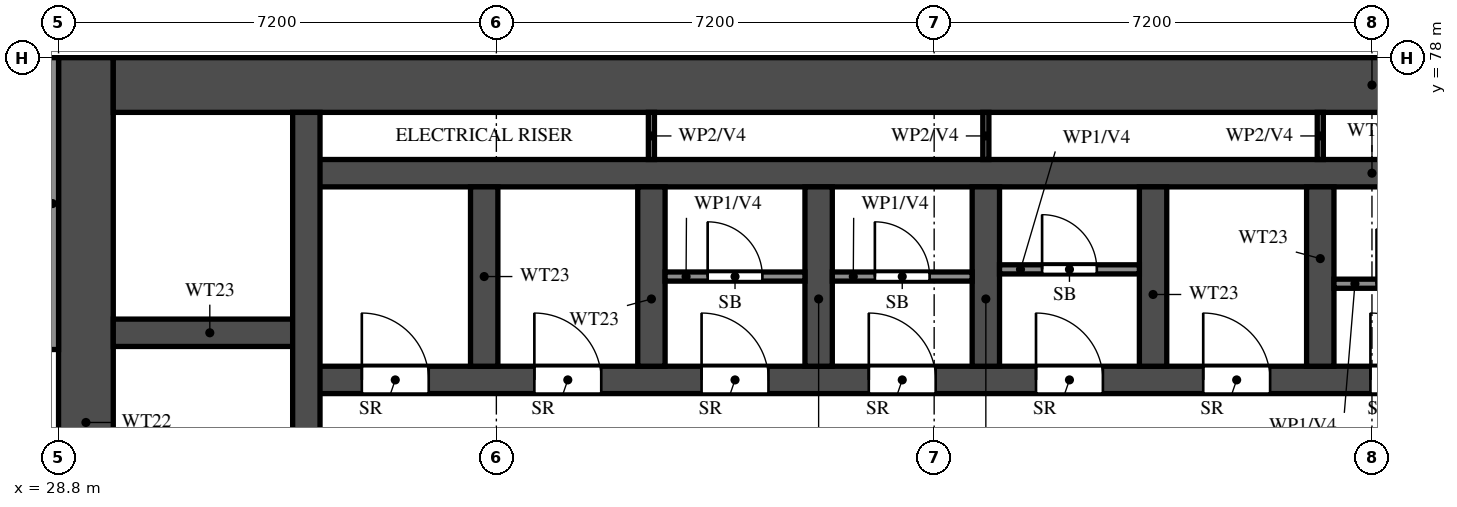
"""IFC4 building model, lengths in metres.
Left out: names, types, materials, properties, quantities, classifications, styles, units other than length and angle.
Written with IfcOpenShell. Run it as: python <this file> out.ifc"""

import sys

from ifc_helpers import new_model, si_unit, direction, frame, frame_2d, origin, place, context, subcontext, project, spatial, rectangle, extrude, element, fill, save


model = new_model("IFC4")
c1 = context("Model", 3, precision=1e-05, world=origin(), true_north=direction((0.0, 1.0)))
c2 = subcontext(c1, "Body", "Model", "MODEL_VIEW")
j1 = project(units=[si_unit("LENGTHUNIT", "METRE"), si_unit("PLANEANGLEUNIT", "RADIAN")], contexts=[c1])
p1 = place(None, origin())
s1 = spatial("IfcSite", under=j1, at=p1, CompositionType="ELEMENT")
p2 = place(p1, origin())
s2 = spatial("IfcBuilding", under=s1, at=p2, CompositionType="ELEMENT")
p3 = place(p2, frame((0.0, 0.0, 104.0)))
s3 = spatial("IfcBuildingStorey", under=s2, at=p3, CompositionType="ELEMENT", Elevation=104.0)
p4 = place(p3, frame((29.25, 66.0, 0.0), z_axis=(0.0, 0.0, 1.0), x_axis=(0.0, 1.0, 0.0)))
e1 = element("IfcWall", 1, at=p4, inside=s3, PredefinedType="SHEAR", context=c2, shape_type="SweptSolid", body=[
    extrude(rectangle(XDim=12.0, YDim=0.9, at=frame_2d((6.0, 0.0))), origin(), (0.0, 0.0, 1.0), 3.1),
])
p5 = place(p3, frame((29.7, 77.55, 0.0), z_axis=(0.0, 0.0, 1.0), x_axis=(1.0, 0.0, 0.0)))
e2 = element("IfcWall", 2, at=p5, inside=s3, PredefinedType="SHEAR", context=c2, shape_type="SweptSolid", body=[
    extrude(rectangle(XDim=41.4, YDim=0.9, at=frame_2d((20.7, 0.0))), origin(), (0.0, 0.0, 1.0), 3.1),
])
p6 = place(p3, frame((32.875, 72.7, 0.0), z_axis=(0.0, 0.0, 1.0), x_axis=(1.0, 0.0, 0.0)))
e3 = element("IfcWall", 3, at=p6, inside=s3, PredefinedType="SHEAR", context=c2, shape_type="SweptSolid", body=[
    extrude(rectangle(XDim=35.05, YDim=0.45, at=frame_2d((17.525, 0.0))), origin(), (0.0, 0.0, 1.0), 3.1),
])
p7 = place(p6, frame((19.8, 0.0, 0.0)))
e4 = element("IfcOpeningElement", 4, at=p7, cuts=e3, PredefinedType="OPENING", context=c2, shape_type="SweptSolid", body=[
    extrude(rectangle(XDim=1.1, YDim=2.1, at=frame_2d((0.55, 1.05))), frame((0.0, 0.235, 0.0), z_axis=(0.0, -1.0, 0.0), x_axis=(1.0, 0.0, 0.0)), (0.0, 0.0, 1.0), 0.47),
])
p8 = place(p6, frame((27.65, 0.0, 0.0)))
e5 = element("IfcOpeningElement", 5, at=p8, cuts=e3, PredefinedType="OPENING", context=c2, shape_type="SweptSolid", body=[
    extrude(rectangle(XDim=1.1, YDim=2.1, at=frame_2d((0.55, 1.05))), frame((0.0, 0.235, 0.0), z_axis=(0.0, -1.0, 0.0), x_axis=(1.0, 0.0, 0.0)), (0.0, 0.0, 1.0), 0.47),
])
p9 = place(p6, frame((30.25, 0.0, 0.0)))
e6 = element("IfcOpeningElement", 6, at=p9, cuts=e3, PredefinedType="OPENING", context=c2, shape_type="SweptSolid", body=[
    extrude(rectangle(XDim=1.1, YDim=2.1, at=frame_2d((0.55, 1.05))), frame((0.0, 0.235, 0.0), z_axis=(0.0, -1.0, 0.0), x_axis=(1.0, 0.0, 0.0)), (0.0, 0.0, 1.0), 0.47),
])
p10 = place(p6, frame((3.75, 0.0, 0.0)))
e7 = element("IfcOpeningElement", 7, at=p10, cuts=e3, PredefinedType="OPENING", context=c2, shape_type="SweptSolid", body=[
    extrude(rectangle(XDim=1.1, YDim=2.1, at=frame_2d((0.55, 1.05))), frame((0.0, 0.235, 0.0), z_axis=(0.0, -1.0, 0.0), x_axis=(1.0, 0.0, 0.0)), (0.0, 0.0, 1.0), 0.47),
])
p11 = place(p6, frame((6.5, 0.0, 0.0)))
e8 = element("IfcOpeningElement", 8, at=p11, cuts=e3, PredefinedType="OPENING", context=c2, shape_type="SweptSolid", body=[
    extrude(rectangle(XDim=1.1, YDim=2.1, at=frame_2d((0.55, 1.05))), frame((0.0, 0.235, 0.0), z_axis=(0.0, -1.0, 0.0), x_axis=(1.0, 0.0, 0.0)), (0.0, 0.0, 1.0), 0.47),
])
p12 = place(p6, frame((9.25, 0.0, 0.0)))
e9 = element("IfcOpeningElement", 9, at=p12, cuts=e3, PredefinedType="OPENING", context=c2, shape_type="SweptSolid", body=[
    extrude(rectangle(XDim=1.1, YDim=2.1, at=frame_2d((0.55, 1.05))), frame((0.0, 0.235, 0.0), z_axis=(0.0, -1.0, 0.0), x_axis=(1.0, 0.0, 0.0)), (0.0, 0.0, 1.0), 0.47),
])
p13 = place(p6, frame((12.0, 0.0, 0.0)))
e10 = element("IfcOpeningElement", 10, at=p13, cuts=e3, PredefinedType="OPENING", context=c2, shape_type="SweptSolid", body=[
    extrude(rectangle(XDim=1.1, YDim=2.1, at=frame_2d((0.55, 1.05))), frame((0.0, 0.235, 0.0), z_axis=(0.0, -1.0, 0.0), x_axis=(1.0, 0.0, 0.0)), (0.0, 0.0, 1.0), 0.47),
])
p14 = place(p6, frame((14.75, 0.0, 0.0)))
e11 = element("IfcOpeningElement", 11, at=p14, cuts=e3, PredefinedType="OPENING", context=c2, shape_type="SweptSolid", body=[
    extrude(rectangle(XDim=1.1, YDim=2.1, at=frame_2d((0.55, 1.05))), frame((0.0, 0.235, 0.0), z_axis=(0.0, -1.0, 0.0), x_axis=(1.0, 0.0, 0.0)), (0.0, 0.0, 1.0), 0.47),
])
p15 = place(p6, frame((17.5, 0.0, 0.0)))
e12 = element("IfcOpeningElement", 12, at=p15, cuts=e3, PredefinedType="OPENING", context=c2, shape_type="SweptSolid", body=[
    extrude(rectangle(XDim=1.1, YDim=2.1, at=frame_2d((0.55, 1.05))), frame((0.0, 0.235, 0.0), z_axis=(0.0, -1.0, 0.0), x_axis=(1.0, 0.0, 0.0)), (0.0, 0.0, 1.0), 0.47),
])
p16 = place(p6, frame((0.913, 0.0, 0.0)))
e13 = element("IfcOpeningElement", 13, at=p16, cuts=e3, PredefinedType="OPENING", context=c2, shape_type="SweptSolid", body=[
    extrude(rectangle(XDim=1.1, YDim=2.1, at=frame_2d((0.55, 1.05))), frame((0.0, 0.235, 0.0), z_axis=(0.0, -1.0, 0.0), x_axis=(1.0, 0.0, 0.0)), (0.0, 0.0, 1.0), 0.47),
])
p17 = place(p3, frame((32.875, 76.1, 0.0), z_axis=(0.0, 0.0, 1.0), x_axis=(1.0, 0.0, 0.0)))
e14 = element("IfcWall", 14, at=p17, inside=s3, PredefinedType="SHEAR", context=c2, shape_type="SweptSolid", body=[
    extrude(rectangle(XDim=35.05, YDim=0.45, at=frame_2d((17.525, 0.0))), origin(), (0.0, 0.0, 1.0), 3.1),
])
p18 = place(p3, frame((29.7, 73.475, 0.0), z_axis=(0.0, 0.0, 1.0), x_axis=(1.0, 0.0, 0.0)))
e15 = element("IfcWall", 15, at=p18, inside=s3, PredefinedType="SHEAR", context=c2, shape_type="SweptSolid", body=[
    extrude(rectangle(XDim=3.175, YDim=0.45, at=frame_2d((1.587, 0.0))), origin(), (0.0, 0.0, 1.0), 3.1),
])
p19 = place(p3, frame((32.875, 66.45, 0.0), z_axis=(0.0, 0.0, 1.0), x_axis=(0.0, 1.0, 0.0)))
e16 = element("IfcWall", 16, at=p19, inside=s3, PredefinedType="SHEAR", context=c2, shape_type="SweptSolid", body=[
    extrude(rectangle(XDim=10.65, YDim=0.45, at=frame_2d((5.325, 0.0))), origin(), (0.0, 0.0, 1.0), 3.1),
])
for number, where, z_axis, x_axis in (
    (17, (35.8, 72.925, 0.0), (0.0, 0.0, 1.0), (0.0, 1.0, 0.0)),
    (18, (38.55, 72.925, 0.0), (0.0, 0.0, 1.0), (0.0, 1.0, 0.0)),
    (19, (41.3, 72.925, 0.0), (0.0, 0.0, 1.0), (0.0, 1.0, 0.0)),
    (20, (44.05, 72.925, 0.0), (0.0, 0.0, 1.0), (0.0, 1.0, 0.0)),
    (21, (46.8, 72.925, 0.0), (0.0, 0.0, 1.0), (0.0, 1.0, 0.0)),
    (22, (49.55, 72.925, 0.0), (0.0, 0.0, 1.0), (0.0, 1.0, 0.0)),
):
    element("IfcWall", number, at=place(p3, frame(where, z_axis=z_axis, x_axis=x_axis)), inside=s3, PredefinedType="SHEAR", context=c2, shape_type="SweptSolid", body=[
        extrude(rectangle(XDim=2.95, YDim=0.45, at=frame_2d((1.475, 0.0))), origin(), (0.0, 0.0, 1.0), 3.1),
    ])
p20 = place(p3, frame((38.775, 74.4, 0.0), z_axis=(0.0, 0.0, 1.0), x_axis=(1.0, 0.0, 0.0)))
e23 = element("IfcWall", 23, at=p20, inside=s3, PredefinedType="PARTITIONING", context=c2, shape_type="SweptSolid", body=[
    extrude(rectangle(XDim=2.3, YDim=0.15, at=frame_2d((1.15, 0.0))), origin(), (0.0, 0.0, 1.0), 3.1),
])
p21 = place(p20, frame((0.7, 0.0, 0.0)))
e24 = element("IfcOpeningElement", 24, at=p21, cuts=e23, PredefinedType="OPENING", context=c2, shape_type="SweptSolid", body=[
    extrude(rectangle(XDim=0.9, YDim=2.1, at=frame_2d((0.45, 1.05))), frame((0.0, 0.085, 0.0), z_axis=(0.0, -1.0, 0.0), x_axis=(1.0, 0.0, 0.0)), (0.0, 0.0, 1.0), 0.17),
])
p22 = place(p3, frame((41.525, 74.4, 0.0), z_axis=(0.0, 0.0, 1.0), x_axis=(1.0, 0.0, 0.0)))
e25 = element("IfcWall", 25, at=p22, inside=s3, PredefinedType="PARTITIONING", context=c2, shape_type="SweptSolid", body=[
    extrude(rectangle(XDim=2.3, YDim=0.15, at=frame_2d((1.15, 0.0))), origin(), (0.0, 0.0, 1.0), 3.1),
])
p23 = place(p22, frame((0.7, 0.0, 0.0)))
e26 = element("IfcOpeningElement", 26, at=p23, cuts=e25, PredefinedType="OPENING", context=c2, shape_type="SweptSolid", body=[
    extrude(rectangle(XDim=0.9, YDim=2.1, at=frame_2d((0.45, 1.05))), frame((0.0, 0.085, 0.0), z_axis=(0.0, -1.0, 0.0), x_axis=(1.0, 0.0, 0.0)), (0.0, 0.0, 1.0), 0.17),
])
p24 = place(p3, frame((44.275, 74.518, 0.0), z_axis=(0.0, 0.0, 1.0), x_axis=(1.0, 0.0, 0.0)))
e27 = element("IfcWall", 27, at=p24, inside=s3, PredefinedType="PARTITIONING", context=c2, shape_type="SweptSolid", body=[
    extrude(rectangle(XDim=2.3, YDim=0.15, at=frame_2d((1.15, 0.0))), origin(), (0.0, 0.0, 1.0), 3.1),
])
p25 = place(p24, frame((0.7, 0.0, 0.0)))
e28 = element("IfcOpeningElement", 28, at=p25, cuts=e27, PredefinedType="OPENING", context=c2, shape_type="SweptSolid", body=[
    extrude(rectangle(XDim=0.9, YDim=2.1, at=frame_2d((0.45, 1.05))), frame((0.0, 0.085, 0.0), z_axis=(0.0, -1.0, 0.0), x_axis=(1.0, 0.0, 0.0)), (0.0, 0.0, 1.0), 0.17),
])
p26 = place(p3, frame((49.775, 74.282, 0.0), z_axis=(0.0, 0.0, 1.0), x_axis=(1.0, 0.0, 0.0)))
e29 = element("IfcWall", 29, at=p26, inside=s3, PredefinedType="PARTITIONING", context=c2, shape_type="SweptSolid", body=[
    extrude(rectangle(XDim=2.3, YDim=0.15, at=frame_2d((1.15, 0.0))), origin(), (0.0, 0.0, 1.0), 3.1),
])
p27 = place(p26, frame((0.7, 0.0, 0.0)))
e30 = element("IfcOpeningElement", 30, at=p27, cuts=e29, PredefinedType="OPENING", context=c2, shape_type="SweptSolid", body=[
    extrude(rectangle(XDim=0.9, YDim=2.1, at=frame_2d((0.45, 1.05))), frame((0.0, 0.085, 0.0), z_axis=(0.0, -1.0, 0.0), x_axis=(1.0, 0.0, 0.0)), (0.0, 0.0, 1.0), 0.17),
])
for number, where, z_axis, x_axis in (
    (31, (38.55, 76.325, 0.0), (0.0, 0.0, 1.0), (0.0, 1.0, 0.0)),
    (32, (44.05, 76.325, 0.0), (0.0, 0.0, 1.0), (0.0, 1.0, 0.0)),
    (33, (49.55, 76.325, 0.0), (0.0, 0.0, 1.0), (0.0, 1.0, 0.0)),
):
    element("IfcWall", number, at=place(p3, frame(where, z_axis=z_axis, x_axis=x_axis)), inside=s3, PredefinedType="PARTITIONING", context=c2, shape_type="SweptSolid", body=[
        extrude(rectangle(XDim=0.775, YDim=0.1, at=frame_2d((0.388, 0.0))), origin(), (0.0, 0.0, 1.0), 3.1),
    ])
p28 = place(p3, frame((28.7, 73.2, 0.0), z_axis=(0.0, 0.0, 1.0), x_axis=(0.0, 1.0, 0.0)))
e34 = element("IfcWall", 34, at=p28, inside=s3, PredefinedType="SOLIDWALL", context=c2, shape_type="SweptSolid", body=[
    extrude(rectangle(XDim=4.8, YDim=0.2, at=frame_2d((2.4, 0.0))), origin(), (0.0, 0.0, 1.0), 3.1),
])
p29 = place(p10, origin())
e35 = element("IfcDoor", 35, at=p29, inside=s3, OperationType="SINGLE_SWING_LEFT", PredefinedType="DOOR", context=c2, shape_type="SweptSolid", body=[
    extrude(rectangle(XDim=1.1, YDim=2.1, at=frame_2d((0.55, 1.05))), frame((0.0, 0.025, 0.0), z_axis=(0.0, -1.0, 0.0), x_axis=(1.0, 0.0, 0.0)), (0.0, 0.0, 1.0), 0.05),
])
fill(e7, e35)
p30 = place(p11, origin())
e36 = element("IfcDoor", 36, at=p30, inside=s3, OperationType="SINGLE_SWING_LEFT", PredefinedType="DOOR", context=c2, shape_type="SweptSolid", body=[
    extrude(rectangle(XDim=1.1, YDim=2.1, at=frame_2d((0.55, 1.05))), frame((0.0, 0.025, 0.0), z_axis=(0.0, -1.0, 0.0), x_axis=(1.0, 0.0, 0.0)), (0.0, 0.0, 1.0), 0.05),
])
fill(e8, e36)
p31 = place(p21, origin())
e37 = element("IfcDoor", 37, at=p31, inside=s3, OperationType="SINGLE_SWING_RIGHT", PredefinedType="DOOR", context=c2, shape_type="SweptSolid", body=[
    extrude(rectangle(XDim=0.9, YDim=2.1, at=frame_2d((0.45, 1.05))), frame((0.0, 0.025, 0.0), z_axis=(0.0, -1.0, 0.0), x_axis=(1.0, 0.0, 0.0)), (0.0, 0.0, 1.0), 0.05),
])
fill(e24, e37)
p32 = place(p12, origin())
e38 = element("IfcDoor", 38, at=p32, inside=s3, OperationType="SINGLE_SWING_LEFT", PredefinedType="DOOR", context=c2, shape_type="SweptSolid", body=[
    extrude(rectangle(XDim=1.1, YDim=2.1, at=frame_2d((0.55, 1.05))), frame((0.0, 0.025, 0.0), z_axis=(0.0, -1.0, 0.0), x_axis=(1.0, 0.0, 0.0)), (0.0, 0.0, 1.0), 0.05),
])
fill(e9, e38)
p33 = place(p23, origin())
e39 = element("IfcDoor", 39, at=p33, inside=s3, OperationType="SINGLE_SWING_LEFT", PredefinedType="DOOR", context=c2, shape_type="SweptSolid", body=[
    extrude(rectangle(XDim=0.9, YDim=2.1, at=frame_2d((0.45, 1.05))), frame((0.0, 0.025, 0.0), z_axis=(0.0, -1.0, 0.0), x_axis=(1.0, 0.0, 0.0)), (0.0, 0.0, 1.0), 0.05),
])
fill(e26, e39)
p34 = place(p13, origin())
e40 = element("IfcDoor", 40, at=p34, inside=s3, OperationType="SINGLE_SWING_LEFT", PredefinedType="DOOR", context=c2, shape_type="SweptSolid", body=[
    extrude(rectangle(XDim=1.1, YDim=2.1, at=frame_2d((0.55, 1.05))), frame((0.0, 0.025, 0.0), z_axis=(0.0, -1.0, 0.0), x_axis=(1.0, 0.0, 0.0)), (0.0, 0.0, 1.0), 0.05),
])
fill(e10, e40)
p35 = place(p25, origin())
e41 = element("IfcDoor", 41, at=p35, inside=s3, OperationType="SINGLE_SWING_LEFT", PredefinedType="DOOR", context=c2, shape_type="SweptSolid", body=[
    extrude(rectangle(XDim=0.9, YDim=2.1, at=frame_2d((0.45, 1.05))), frame((0.0, 0.025, 0.0), z_axis=(0.0, -1.0, 0.0), x_axis=(1.0, 0.0, 0.0)), (0.0, 0.0, 1.0), 0.05),
])
fill(e28, e41)
p36 = place(p14, origin())
e42 = element("IfcDoor", 42, at=p36, inside=s3, OperationType="SINGLE_SWING_LEFT", PredefinedType="DOOR", context=c2, shape_type="SweptSolid", body=[
    extrude(rectangle(XDim=1.1, YDim=2.1, at=frame_2d((0.55, 1.05))), frame((0.0, 0.025, 0.0), z_axis=(0.0, -1.0, 0.0), x_axis=(1.0, 0.0, 0.0)), (0.0, 0.0, 1.0), 0.05),
])
fill(e11, e42)
p37 = place(p15, origin())
e43 = element("IfcDoor", 43, at=p37, inside=s3, OperationType="SINGLE_SWING_LEFT", PredefinedType="DOOR", context=c2, shape_type="SweptSolid", body=[
    extrude(rectangle(XDim=1.1, YDim=2.1, at=frame_2d((0.55, 1.05))), frame((0.0, 0.025, 0.0), z_axis=(0.0, -1.0, 0.0), x_axis=(1.0, 0.0, 0.0)), (0.0, 0.0, 1.0), 0.05),
])
fill(e12, e43)
p38 = place(p27, origin())
e44 = element("IfcDoor", 44, at=p38, inside=s3, OperationType="SINGLE_SWING_RIGHT", PredefinedType="DOOR", context=c2, shape_type="SweptSolid", body=[
    extrude(rectangle(XDim=0.9, YDim=2.1, at=frame_2d((0.45, 1.05))), frame((0.0, 0.025, 0.0), z_axis=(0.0, -1.0, 0.0), x_axis=(1.0, 0.0, 0.0)), (0.0, 0.0, 1.0), 0.05),
])
fill(e30, e44)
p39 = place(p16, origin())
e45 = element("IfcDoor", 45, at=p39, inside=s3, OperationType="SINGLE_SWING_LEFT", PredefinedType="DOOR", context=c2, shape_type="SweptSolid", body=[
    extrude(rectangle(XDim=1.1, YDim=2.1, at=frame_2d((0.55, 1.05))), frame((0.0, 0.025, 0.0), z_axis=(0.0, -1.0, 0.0), x_axis=(1.0, 0.0, 0.0)), (0.0, 0.0, 1.0), 0.05),
])
fill(e13, e45)
save(model, sys.argv[1])
